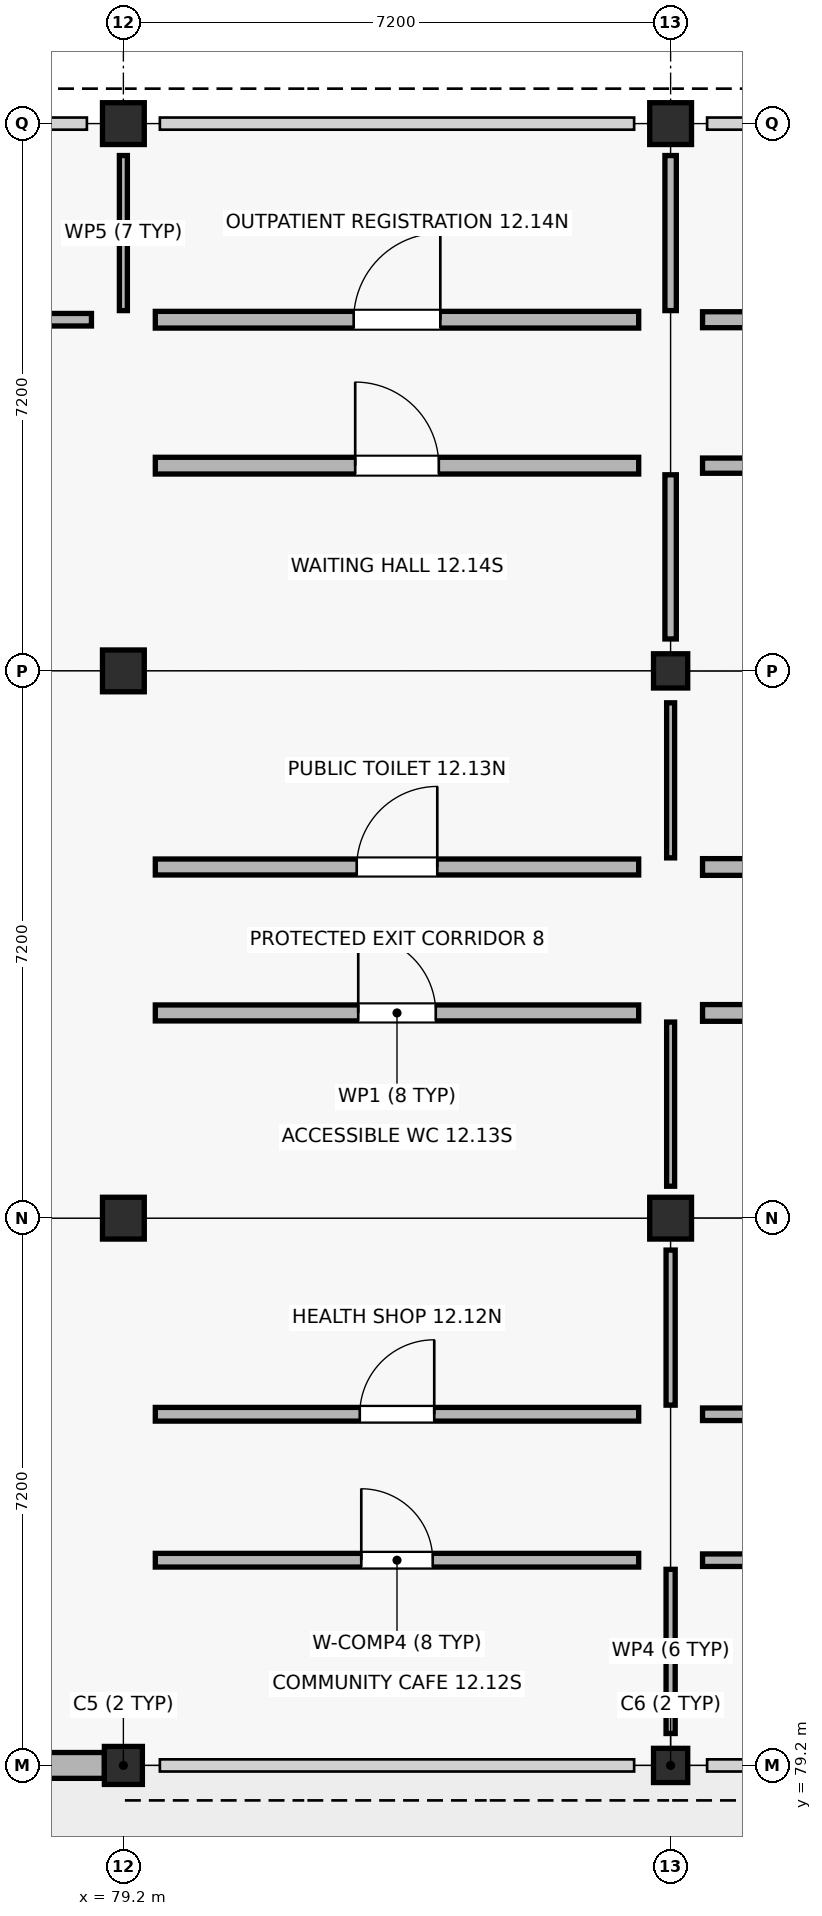
"""IFC4 building model, lengths in metres.
Left out: names, types, materials, properties, quantities, classifications, styles, units other than length and angle.
Written with IfcOpenShell. Run it as: python <this file> out.ifc"""

import sys

from ifc_helpers import new_model, si_unit, direction, frame, frame_2d, origin, origin_2d, place, context, subcontext, project, spatial, rectangle, extrude, element, fill, save


model = new_model("IFC4")
c1 = context("Model", 3, precision=1e-05, world=origin(), true_north=direction((0.0, 1.0)))
c2 = subcontext(c1, "Body", "Model", "MODEL_VIEW")
j1 = project(units=[si_unit("LENGTHUNIT", "METRE"), si_unit("PLANEANGLEUNIT", "RADIAN")], contexts=[c1])
p1 = place(None, origin())
s1 = spatial("IfcSite", under=j1, at=p1, CompositionType="ELEMENT")
p2 = place(p1, origin())
s2 = spatial("IfcBuilding", under=s1, at=p2, CompositionType="ELEMENT")
p3 = place(p2, origin())
s3 = spatial("IfcBuildingStorey", under=s2, at=p3, CompositionType="ELEMENT", Elevation=0.0)
p4 = place(p3, frame((79.2, 79.2, -0.25), z_axis=(0.0, 0.0, 1.0), x_axis=(1.0, 0.0, 0.0)))
e1 = element("IfcColumn", 1, at=p4, inside=s3, PredefinedType="COLUMN", context=c2, shape_type="SweptSolid", body=[
    extrude(rectangle(XDim=0.5, YDim=0.5, at=origin_2d()), origin(), (0.0, 0.0, 1.0), 4.53),
])
for number, where, z_axis, x_axis in (
    (2, (79.2, 86.4, -0.25), (0.0, 0.0, 1.0), (1.0, 0.0, 0.0)),
    (3, (79.2, 93.6, -0.25), (0.0, 0.0, 1.0), (1.0, 0.0, 0.0)),
    (4, (79.2, 100.8, -0.25), (0.0, 0.0, 1.0), (1.0, 0.0, 0.0)),
):
    element("IfcColumn", number, at=place(p3, frame(where, z_axis=z_axis, x_axis=x_axis)), inside=s3, PredefinedType="COLUMN", context=c2, shape_type="SweptSolid", body=[
        extrude(rectangle(XDim=0.55, YDim=0.55, at=origin_2d()), origin(), (0.0, 0.0, 1.0), 4.75),
    ])
p5 = place(p3, frame((86.4, 79.2, -0.25), z_axis=(0.0, 0.0, 1.0), x_axis=(1.0, 0.0, 0.0)))
e5 = element("IfcColumn", 5, at=p5, inside=s3, PredefinedType="COLUMN", context=c2, shape_type="SweptSolid", body=[
    extrude(rectangle(XDim=0.45, YDim=0.45, at=origin_2d()), origin(), (0.0, 0.0, 1.0), 4.53),
])
p6 = place(p3, frame((86.4, 86.4, -0.25), z_axis=(0.0, 0.0, 1.0), x_axis=(1.0, 0.0, 0.0)))
e6 = element("IfcColumn", 6, at=p6, inside=s3, PredefinedType="COLUMN", context=c2, shape_type="SweptSolid", body=[
    extrude(rectangle(XDim=0.55, YDim=0.55, at=origin_2d()), origin(), (0.0, 0.0, 1.0), 4.75),
])
p7 = place(p3, frame((86.4, 93.6, -0.25), z_axis=(0.0, 0.0, 1.0), x_axis=(1.0, 0.0, 0.0)))
e7 = element("IfcColumn", 7, at=p7, inside=s3, PredefinedType="COLUMN", context=c2, shape_type="SweptSolid", body=[
    extrude(rectangle(XDim=0.45, YDim=0.45, at=origin_2d()), origin(), (0.0, 0.0, 1.0), 4.53),
])
p8 = place(p3, frame((86.4, 100.8, -0.25), z_axis=(0.0, 0.0, 1.0), x_axis=(1.0, 0.0, 0.0)))
e8 = element("IfcColumn", 8, at=p8, inside=s3, PredefinedType="COLUMN", context=c2, shape_type="SweptSolid", body=[
    extrude(rectangle(XDim=0.55, YDim=0.55, at=origin_2d()), origin(), (0.0, 0.0, 1.0), 4.75),
])
p9 = place(p3, frame((78.95, 79.2, 0.0), z_axis=(0.0, 0.0, 1.0), x_axis=(-1.0, 0.0, 0.0)))
e9 = element("IfcWall", 9, at=p9, inside=s3, PredefinedType="SOLIDWALL", context=c2, shape_type="SweptSolid", body=[
    extrude(rectangle(XDim=6.675, YDim=0.34, at=frame_2d((3.337, 0.0))), origin(), (0.0, 0.0, 1.0), 3.47),
])
p10 = place(p9, frame((2.438, 0.0, 0.0)))
e10 = element("IfcOpeningElement", 10, at=p10, cuts=e9, PredefinedType="OPENING", context=c2, shape_type="SweptSolid", body=[
    extrude(rectangle(XDim=1.8, YDim=2.25, at=frame_2d((0.9, 1.125))), frame((0.0, 0.18, 0.0), z_axis=(0.0, -1.0, 0.0), x_axis=(1.0, 0.0, 0.0)), (0.0, 0.0, 1.0), 0.36),
])
p11 = place(p3, frame((72.42, 98.22, 0.0), z_axis=(0.0, 0.0, 1.0), x_axis=(1.0, 0.0, 0.0)))
e11 = element("IfcWall", 11, at=p11, inside=s3, PredefinedType="PARTITIONING", context=c2, shape_type="SweptSolid", body=[
    extrude(rectangle(XDim=6.36, YDim=0.165, at=frame_2d((3.18, 0.0))), origin(), (0.0, 0.0, 1.0), 3.36),
])
p12 = place(p11, frame((2.73, 0.0, 0.0)))
e12 = element("IfcOpeningElement", 12, at=p12, cuts=e11, PredefinedType="OPENING", context=c2, shape_type="SweptSolid", body=[
    extrude(rectangle(XDim=0.9, YDim=2.04, at=frame_2d((0.45, 1.02))), frame((0.0, 0.093, 0.0), z_axis=(0.0, -1.0, 0.0), x_axis=(1.0, 0.0, 0.0)), (0.0, 0.0, 1.0), 0.185),
])
p13 = place(p3, frame((79.2, 98.34, 0.0), z_axis=(0.0, 0.0, 1.0), x_axis=(0.0, 1.0, 0.0)))
e13 = element("IfcWall", 13, at=p13, inside=s3, PredefinedType="PARTITIONING", context=c2, shape_type="SweptSolid", body=[
    extrude(rectangle(XDim=2.04, YDim=0.105, at=frame_2d((1.02, 0.0))), origin(), (0.0, 0.0, 1.0), 3.36),
])
p14 = place(p3, frame((79.62, 81.9, 0.0), z_axis=(0.0, 0.0, 1.0), x_axis=(1.0, 0.0, 0.0)))
e14 = element("IfcWall", 14, at=p14, inside=s3, PredefinedType="PARTITIONING", context=c2, shape_type="SweptSolid", body=[
    extrude(rectangle(XDim=6.36, YDim=0.18, at=frame_2d((3.18, 0.0))), origin(), (0.0, 0.0, 1.0), 3.36),
])
p15 = place(p14, frame((2.71, 0.0, 0.0)))
e15 = element("IfcOpeningElement", 15, at=p15, cuts=e14, PredefinedType="OPENING", context=c2, shape_type="SweptSolid", body=[
    extrude(rectangle(XDim=0.94, YDim=2.04, at=frame_2d((0.47, 1.02))), frame((0.0, 0.1, 0.0), z_axis=(0.0, -1.0, 0.0), x_axis=(1.0, 0.0, 0.0)), (0.0, 0.0, 1.0), 0.2),
])
p16 = place(p3, frame((86.4, 79.62, 0.0), z_axis=(0.0, 0.0, 1.0), x_axis=(0.0, 1.0, 0.0)))
e16 = element("IfcWall", 16, at=p16, inside=s3, PredefinedType="PARTITIONING", context=c2, shape_type="SweptSolid", body=[
    extrude(rectangle(XDim=2.16, YDim=0.12, at=frame_2d((1.08, 0.0))), origin(), (0.0, 0.0, 1.0), 3.36),
])
p17 = place(p3, frame((79.62, 83.82, 0.0), z_axis=(0.0, 0.0, 1.0), x_axis=(1.0, 0.0, 0.0)))
e17 = element("IfcWall", 17, at=p17, inside=s3, PredefinedType="PARTITIONING", context=c2, shape_type="SweptSolid", body=[
    extrude(rectangle(XDim=6.36, YDim=0.18, at=frame_2d((3.18, 0.0))), origin(), (0.0, 0.0, 1.0), 3.36),
])
p18 = place(p17, frame((2.69, 0.0, 0.0)))
e18 = element("IfcOpeningElement", 18, at=p18, cuts=e17, PredefinedType="OPENING", context=c2, shape_type="SweptSolid", body=[
    extrude(rectangle(XDim=0.98, YDim=2.04, at=frame_2d((0.49, 1.02))), frame((0.0, 0.1, 0.0), z_axis=(0.0, -1.0, 0.0), x_axis=(1.0, 0.0, 0.0)), (0.0, 0.0, 1.0), 0.2),
])
p19 = place(p3, frame((86.4, 83.94, 0.0), z_axis=(0.0, 0.0, 1.0), x_axis=(0.0, 1.0, 0.0)))
e19 = element("IfcWall", 19, at=p19, inside=s3, PredefinedType="PARTITIONING", context=c2, shape_type="SweptSolid", body=[
    extrude(rectangle(XDim=2.04, YDim=0.12, at=frame_2d((1.02, 0.0))), origin(), (0.0, 0.0, 1.0), 3.36),
])
p20 = place(p3, frame((79.62, 89.1, 0.0), z_axis=(0.0, 0.0, 1.0), x_axis=(1.0, 0.0, 0.0)))
e20 = element("IfcWall", 20, at=p20, inside=s3, PredefinedType="PLUMBINGWALL", context=c2, shape_type="SweptSolid", body=[
    extrude(rectangle(XDim=6.36, YDim=0.21, at=frame_2d((3.18, 0.0))), origin(), (0.0, 0.0, 1.0), 3.36),
])
p21 = place(p20, frame((2.67, 0.0, 0.0)))
e21 = element("IfcOpeningElement", 21, at=p21, cuts=e20, PredefinedType="OPENING", context=c2, shape_type="SweptSolid", body=[
    extrude(rectangle(XDim=1.02, YDim=2.04, at=frame_2d((0.51, 1.02))), frame((0.0, 0.115, 0.0), z_axis=(0.0, -1.0, 0.0), x_axis=(1.0, 0.0, 0.0)), (0.0, 0.0, 1.0), 0.23),
])
p22 = place(p3, frame((86.4, 86.82, 0.0), z_axis=(0.0, 0.0, 1.0), x_axis=(0.0, 1.0, 0.0)))
e22 = element("IfcWall", 22, at=p22, inside=s3, PredefinedType="PARTITIONING", context=c2, shape_type="SweptSolid", body=[
    extrude(rectangle(XDim=2.16, YDim=0.105, at=frame_2d((1.08, 0.0))), origin(), (0.0, 0.0, 1.0), 3.36),
])
p23 = place(p3, frame((79.62, 91.02, 0.0), z_axis=(0.0, 0.0, 1.0), x_axis=(1.0, 0.0, 0.0)))
e23 = element("IfcWall", 23, at=p23, inside=s3, PredefinedType="PLUMBINGWALL", context=c2, shape_type="SweptSolid", body=[
    extrude(rectangle(XDim=6.36, YDim=0.21, at=frame_2d((3.18, 0.0))), origin(), (0.0, 0.0, 1.0), 3.36),
])
p24 = place(p23, frame((2.65, 0.0, 0.0)))
e24 = element("IfcOpeningElement", 24, at=p24, cuts=e23, PredefinedType="OPENING", context=c2, shape_type="SweptSolid", body=[
    extrude(rectangle(XDim=1.06, YDim=2.04, at=frame_2d((0.53, 1.02))), frame((0.0, 0.115, 0.0), z_axis=(0.0, -1.0, 0.0), x_axis=(1.0, 0.0, 0.0)), (0.0, 0.0, 1.0), 0.23),
])
p25 = place(p3, frame((86.4, 91.14, 0.0), z_axis=(0.0, 0.0, 1.0), x_axis=(0.0, 1.0, 0.0)))
e25 = element("IfcWall", 25, at=p25, inside=s3, PredefinedType="PARTITIONING", context=c2, shape_type="SweptSolid", body=[
    extrude(rectangle(XDim=2.04, YDim=0.105, at=frame_2d((1.02, 0.0))), origin(), (0.0, 0.0, 1.0), 3.36),
])
p26 = place(p3, frame((79.62, 96.3, 0.0), z_axis=(0.0, 0.0, 1.0), x_axis=(1.0, 0.0, 0.0)))
e26 = element("IfcWall", 26, at=p26, inside=s3, PredefinedType="SOLIDWALL", context=c2, shape_type="SweptSolid", body=[
    extrude(rectangle(XDim=6.36, YDim=0.22, at=frame_2d((3.18, 0.0))), origin(), (0.0, 0.0, 1.0), 3.36),
])
p27 = place(p26, frame((2.63, 0.0, 0.0)))
e27 = element("IfcOpeningElement", 27, at=p27, cuts=e26, PredefinedType="OPENING", context=c2, shape_type="SweptSolid", body=[
    extrude(rectangle(XDim=1.1, YDim=2.04, at=frame_2d((0.55, 1.02))), frame((0.0, 0.12, 0.0), z_axis=(0.0, -1.0, 0.0), x_axis=(1.0, 0.0, 0.0)), (0.0, 0.0, 1.0), 0.24),
])
p28 = place(p3, frame((86.4, 94.02, 0.0), z_axis=(0.0, 0.0, 1.0), x_axis=(0.0, 1.0, 0.0)))
e28 = element("IfcWall", 28, at=p28, inside=s3, PredefinedType="PARTITIONING", context=c2, shape_type="SweptSolid", body=[
    extrude(rectangle(XDim=2.16, YDim=0.15, at=frame_2d((1.08, 0.0))), origin(), (0.0, 0.0, 1.0), 3.36),
])
p29 = place(p3, frame((79.62, 98.22, 0.0), z_axis=(0.0, 0.0, 1.0), x_axis=(1.0, 0.0, 0.0)))
e29 = element("IfcWall", 29, at=p29, inside=s3, PredefinedType="SOLIDWALL", context=c2, shape_type="SweptSolid", body=[
    extrude(rectangle(XDim=6.36, YDim=0.22, at=frame_2d((3.18, 0.0))), origin(), (0.0, 0.0, 1.0), 3.36),
])
p30 = place(p29, frame((2.61, 0.0, 0.0)))
e30 = element("IfcOpeningElement", 30, at=p30, cuts=e29, PredefinedType="OPENING", context=c2, shape_type="SweptSolid", body=[
    extrude(rectangle(XDim=1.14, YDim=2.04, at=frame_2d((0.57, 1.02))), frame((0.0, 0.12, 0.0), z_axis=(0.0, -1.0, 0.0), x_axis=(1.0, 0.0, 0.0)), (0.0, 0.0, 1.0), 0.24),
])
p31 = place(p3, frame((86.4, 98.34, 0.0), z_axis=(0.0, 0.0, 1.0), x_axis=(0.0, 1.0, 0.0)))
e31 = element("IfcWall", 31, at=p31, inside=s3, PredefinedType="PARTITIONING", context=c2, shape_type="SweptSolid", body=[
    extrude(rectangle(XDim=2.04, YDim=0.15, at=frame_2d((1.02, 0.0))), origin(), (0.0, 0.0, 1.0), 3.36),
])
p32 = place(p3, frame((86.82, 81.9, 0.0), z_axis=(0.0, 0.0, 1.0), x_axis=(1.0, 0.0, 0.0)))
e32 = element("IfcWall", 32, at=p32, inside=s3, PredefinedType="PARTITIONING", context=c2, shape_type="SweptSolid", body=[
    extrude(rectangle(XDim=6.36, YDim=0.165, at=frame_2d((3.18, 0.0))), origin(), (0.0, 0.0, 1.0), 3.36),
])
p33 = place(p32, frame((2.59, 0.0, 0.0)))
e33 = element("IfcOpeningElement", 33, at=p33, cuts=e32, PredefinedType="OPENING", context=c2, shape_type="SweptSolid", body=[
    extrude(rectangle(XDim=1.18, YDim=2.04, at=frame_2d((0.59, 1.02))), frame((0.0, 0.093, 0.0), z_axis=(0.0, -1.0, 0.0), x_axis=(1.0, 0.0, 0.0)), (0.0, 0.0, 1.0), 0.185),
])
p34 = place(p3, frame((86.82, 83.82, 0.0), z_axis=(0.0, 0.0, 1.0), x_axis=(1.0, 0.0, 0.0)))
e34 = element("IfcWall", 34, at=p34, inside=s3, PredefinedType="PARTITIONING", context=c2, shape_type="SweptSolid", body=[
    extrude(rectangle(XDim=6.36, YDim=0.165, at=frame_2d((3.18, 0.0))), origin(), (0.0, 0.0, 1.0), 3.36),
])
p35 = place(p34, frame((2.57, 0.0, 0.0)))
e35 = element("IfcOpeningElement", 35, at=p35, cuts=e34, PredefinedType="OPENING", context=c2, shape_type="SweptSolid", body=[
    extrude(rectangle(XDim=1.22, YDim=2.04, at=frame_2d((0.61, 1.02))), frame((0.0, 0.093, 0.0), z_axis=(0.0, -1.0, 0.0), x_axis=(1.0, 0.0, 0.0)), (0.0, 0.0, 1.0), 0.185),
])
p36 = place(p3, frame((86.82, 89.1, 0.0), z_axis=(0.0, 0.0, 1.0), x_axis=(1.0, 0.0, 0.0)))
e36 = element("IfcWall", 36, at=p36, inside=s3, PredefinedType="SOLIDWALL", context=c2, shape_type="SweptSolid", body=[
    extrude(rectangle(XDim=6.36, YDim=0.22, at=frame_2d((3.18, 0.0))), origin(), (0.0, 0.0, 1.0), 3.36),
])
p37 = place(p36, frame((2.55, 0.0, 0.0)))
e37 = element("IfcOpeningElement", 37, at=p37, cuts=e36, PredefinedType="OPENING", context=c2, shape_type="SweptSolid", body=[
    extrude(rectangle(XDim=1.26, YDim=2.04, at=frame_2d((0.63, 1.02))), frame((0.0, 0.12, 0.0), z_axis=(0.0, -1.0, 0.0), x_axis=(1.0, 0.0, 0.0)), (0.0, 0.0, 1.0), 0.24),
])
p38 = place(p3, frame((86.82, 91.02, 0.0), z_axis=(0.0, 0.0, 1.0), x_axis=(1.0, 0.0, 0.0)))
e38 = element("IfcWall", 38, at=p38, inside=s3, PredefinedType="SOLIDWALL", context=c2, shape_type="SweptSolid", body=[
    extrude(rectangle(XDim=6.36, YDim=0.22, at=frame_2d((3.18, 0.0))), origin(), (0.0, 0.0, 1.0), 3.36),
])
p39 = place(p38, frame((2.53, 0.0, 0.0)))
e39 = element("IfcOpeningElement", 39, at=p39, cuts=e38, PredefinedType="OPENING", context=c2, shape_type="SweptSolid", body=[
    extrude(rectangle(XDim=1.3, YDim=2.04, at=frame_2d((0.65, 1.02))), frame((0.0, 0.12, 0.0), z_axis=(0.0, -1.0, 0.0), x_axis=(1.0, 0.0, 0.0)), (0.0, 0.0, 1.0), 0.24),
])
p40 = place(p3, frame((86.82, 96.3, 0.0), z_axis=(0.0, 0.0, 1.0), x_axis=(1.0, 0.0, 0.0)))
e40 = element("IfcWall", 40, at=p40, inside=s3, PredefinedType="SOLIDWALL", context=c2, shape_type="SweptSolid", body=[
    extrude(rectangle(XDim=6.36, YDim=0.2, at=frame_2d((3.18, 0.0))), origin(), (0.0, 0.0, 1.0), 3.36),
])
p41 = place(p40, frame((2.51, 0.0, 0.0)))
e41 = element("IfcOpeningElement", 41, at=p41, cuts=e40, PredefinedType="OPENING", context=c2, shape_type="SweptSolid", body=[
    extrude(rectangle(XDim=1.34, YDim=2.04, at=frame_2d((0.67, 1.02))), frame((0.0, 0.11, 0.0), z_axis=(0.0, -1.0, 0.0), x_axis=(1.0, 0.0, 0.0)), (0.0, 0.0, 1.0), 0.22),
])
p42 = place(p3, frame((86.82, 98.22, 0.0), z_axis=(0.0, 0.0, 1.0), x_axis=(1.0, 0.0, 0.0)))
e42 = element("IfcWall", 42, at=p42, inside=s3, PredefinedType="PLUMBINGWALL", context=c2, shape_type="SweptSolid", body=[
    extrude(rectangle(XDim=6.36, YDim=0.21, at=frame_2d((3.18, 0.0))), origin(), (0.0, 0.0, 1.0), 3.36),
])
p43 = place(p42, frame((2.49, 0.0, 0.0)))
e43 = element("IfcOpeningElement", 43, at=p43, cuts=e42, PredefinedType="OPENING", context=c2, shape_type="SweptSolid", body=[
    extrude(rectangle(XDim=1.38, YDim=2.04, at=frame_2d((0.69, 1.02))), frame((0.0, 0.115, 0.0), z_axis=(0.0, -1.0, 0.0), x_axis=(1.0, 0.0, 0.0)), (0.0, 0.0, 1.0), 0.23),
])
p44 = place(p15, origin())
e44 = element("IfcDoor", 44, at=p44, inside=s3, OperationType="SINGLE_SWING_LEFT", PredefinedType="DOOR", context=c2, shape_type="SweptSolid", body=[
    extrude(rectangle(XDim=0.94, YDim=2.04, at=frame_2d((0.47, 1.02))), frame((0.0, 0.025, 0.0), z_axis=(0.0, -1.0, 0.0), x_axis=(1.0, 0.0, 0.0)), (0.0, 0.0, 1.0), 0.05),
])
fill(e15, e44)
p45 = place(p18, origin())
e45 = element("IfcDoor", 45, at=p45, inside=s3, OperationType="SINGLE_SWING_RIGHT", PredefinedType="DOOR", context=c2, shape_type="SweptSolid", body=[
    extrude(rectangle(XDim=0.98, YDim=2.04, at=frame_2d((0.49, 1.02))), frame((0.0, 0.025, 0.0), z_axis=(0.0, -1.0, 0.0), x_axis=(1.0, 0.0, 0.0)), (0.0, 0.0, 1.0), 0.05),
])
fill(e18, e45)
p46 = place(p21, origin())
e46 = element("IfcDoor", 46, at=p46, inside=s3, OperationType="SINGLE_SWING_LEFT", PredefinedType="DOOR", context=c2, shape_type="SweptSolid", body=[
    extrude(rectangle(XDim=1.02, YDim=2.04, at=frame_2d((0.51, 1.02))), frame((0.0, 0.025, 0.0), z_axis=(0.0, -1.0, 0.0), x_axis=(1.0, 0.0, 0.0)), (0.0, 0.0, 1.0), 0.05),
])
fill(e21, e46)
p47 = place(p24, origin())
e47 = element("IfcDoor", 47, at=p47, inside=s3, OperationType="SINGLE_SWING_RIGHT", PredefinedType="DOOR", context=c2, shape_type="SweptSolid", body=[
    extrude(rectangle(XDim=1.06, YDim=2.04, at=frame_2d((0.53, 1.02))), frame((0.0, 0.025, 0.0), z_axis=(0.0, -1.0, 0.0), x_axis=(1.0, 0.0, 0.0)), (0.0, 0.0, 1.0), 0.05),
])
fill(e24, e47)
p48 = place(p27, origin())
e48 = element("IfcDoor", 48, at=p48, inside=s3, OperationType="SINGLE_SWING_LEFT", PredefinedType="DOOR", context=c2, shape_type="SweptSolid", body=[
    extrude(rectangle(XDim=1.1, YDim=2.04, at=frame_2d((0.55, 1.02))), frame((0.0, 0.025, 0.0), z_axis=(0.0, -1.0, 0.0), x_axis=(1.0, 0.0, 0.0)), (0.0, 0.0, 1.0), 0.05),
])
fill(e27, e48)
p49 = place(p30, origin())
e49 = element("IfcDoor", 49, at=p49, inside=s3, OperationType="SINGLE_SWING_RIGHT", PredefinedType="DOOR", context=c2, shape_type="SweptSolid", body=[
    extrude(rectangle(XDim=1.14, YDim=2.04, at=frame_2d((0.57, 1.02))), frame((0.0, 0.025, 0.0), z_axis=(0.0, -1.0, 0.0), x_axis=(1.0, 0.0, 0.0)), (0.0, 0.0, 1.0), 0.05),
])
fill(e30, e49)
save(model, sys.argv[1])
